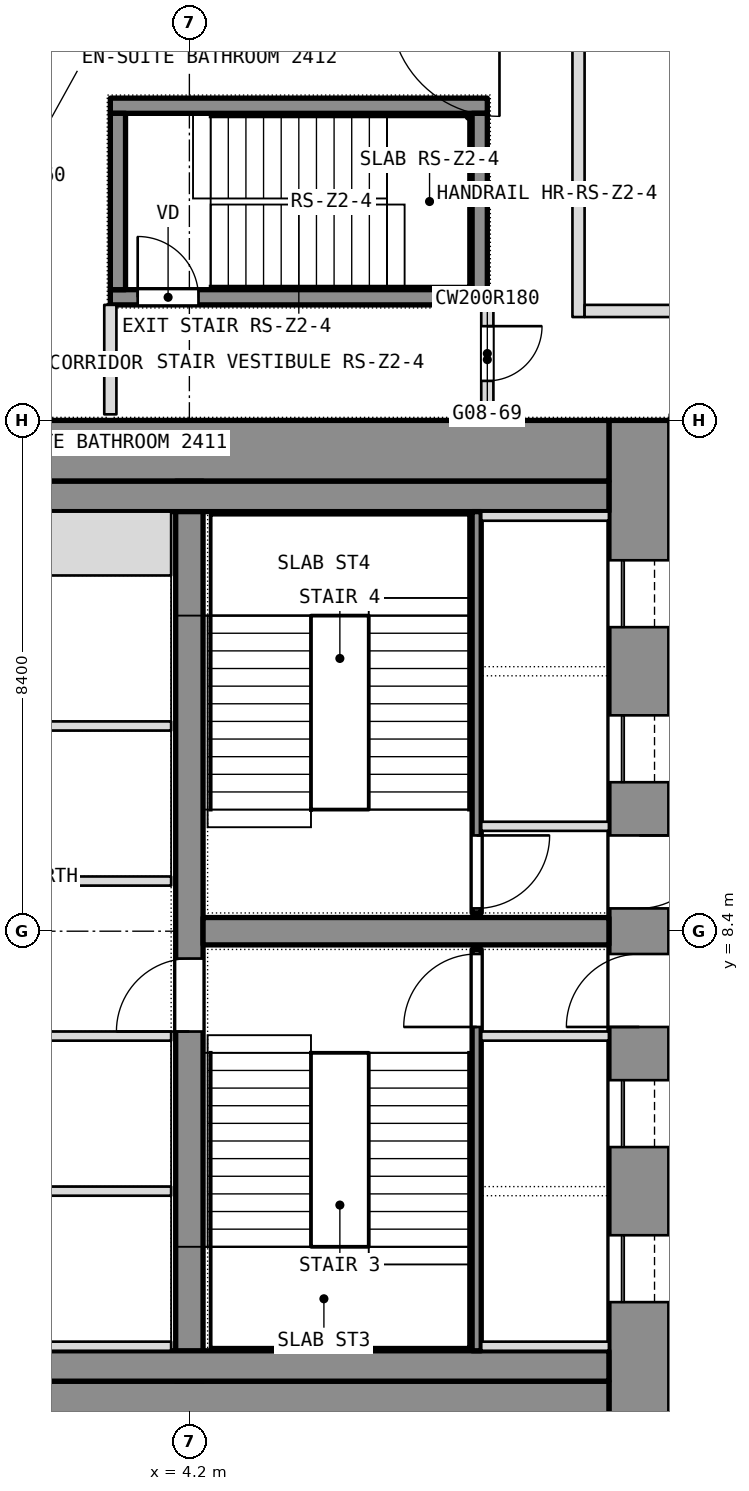
"""IFC4 building model, lengths in metres.
Left out: names, types, materials, properties, quantities, classifications, styles, units other than length and angle.
Written with IfcOpenShell. Run it as: python <this file> out.ifc"""

import sys

from ifc_helpers import new_model, si_unit, direction, frame, frame_2d, origin, place, context, subcontext, project, spatial, rectangle, extrude, element, fill, save


model = new_model("IFC4")
c1 = context("Model", 3, precision=1e-05, world=origin(), true_north=direction((0.0, 1.0)))
c2 = subcontext(c1, "Body", "Model", "MODEL_VIEW")
j1 = project(units=[si_unit("LENGTHUNIT", "METRE"), si_unit("PLANEANGLEUNIT", "RADIAN")], contexts=[c1])
p1 = place(None, origin())
s1 = spatial("IfcSite", under=j1, at=p1, CompositionType="ELEMENT")
p2 = place(p1, origin())
s2 = spatial("IfcBuilding", under=s1, at=p2, CompositionType="ELEMENT")
p3 = place(p2, frame((0.0, 0.0, 112.1)))
s3 = spatial("IfcBuildingStorey", under=s2, at=p3, CompositionType="ELEMENT", Elevation=112.1)
p4 = place(p3, frame((11.6, 0.0, 0.0), z_axis=(0.0, 0.0, 1.0), x_axis=(0.0, 1.0, 0.0)))
e1 = element("IfcWall", 1, at=p4, inside=s3, PredefinedType="SHEAR", context=c2, shape_type="SweptSolid", body=[
    extrude(rectangle(XDim=16.8, YDim=1.0, at=frame_2d((8.4, 0.0))), origin(), (0.0, 0.0, 1.0), 3.6),
])
p5 = place(p4, frame((2.3, 0.0, 0.0)))
e2 = element("IfcOpeningElement", 2, at=p5, cuts=e1, PredefinedType="OPENING", context=c2, shape_type="SweptSolid", body=[
    extrude(rectangle(XDim=1.1, YDim=2.1, at=frame_2d((0.55, 1.05))), frame((0.0, 0.5, 0.0), z_axis=(0.0, -1.0, 0.0), x_axis=(1.0, 0.0, 0.0)), (0.0, 0.0, 1.0), 1.0),
])
p6 = place(p4, frame((4.85, 0.0, 0.0)))
e3 = element("IfcOpeningElement", 3, at=p6, cuts=e1, PredefinedType="OPENING", context=c2, shape_type="SweptSolid", body=[
    extrude(rectangle(XDim=1.1, YDim=2.1, at=frame_2d((0.55, 1.05))), frame((0.0, 0.5, 0.0), z_axis=(0.0, -1.0, 0.0), x_axis=(1.0, 0.0, 0.0)), (0.0, 0.0, 1.0), 1.0),
])
p7 = place(p4, frame((6.825, 0.0, 0.0)))
e4 = element("IfcOpeningElement", 4, at=p7, cuts=e1, PredefinedType="OPENING", context=c2, shape_type="SweptSolid", body=[
    extrude(rectangle(XDim=1.2, YDim=2.1, at=frame_2d((0.6, 1.05))), frame((0.0, 0.5, 0.0), z_axis=(0.0, -1.0, 0.0), x_axis=(1.0, 0.0, 0.0)), (0.0, 0.0, 1.0), 1.0),
])
p8 = place(p4, frame((13.4, 0.0, 0.0)))
e5 = element("IfcOpeningElement", 5, at=p8, cuts=e1, PredefinedType="OPENING", context=c2, shape_type="SweptSolid", body=[
    extrude(rectangle(XDim=1.1, YDim=2.1, at=frame_2d((0.55, 1.05))), frame((0.0, 0.5, 0.0), z_axis=(0.0, -1.0, 0.0), x_axis=(1.0, 0.0, 0.0)), (0.0, 0.0, 1.0), 1.0),
])
p9 = place(p4, frame((10.85, 0.0, 0.0)))
e6 = element("IfcOpeningElement", 6, at=p9, cuts=e1, PredefinedType="OPENING", context=c2, shape_type="SweptSolid", body=[
    extrude(rectangle(XDim=1.1, YDim=2.1, at=frame_2d((0.55, 1.05))), frame((0.0, 0.5, 0.0), z_axis=(0.0, -1.0, 0.0), x_axis=(1.0, 0.0, 0.0)), (0.0, 0.0, 1.0), 1.0),
])
p10 = place(p4, frame((8.775, 0.0, 0.0)))
e7 = element("IfcOpeningElement", 7, at=p10, cuts=e1, PredefinedType="OPENING", context=c2, shape_type="SweptSolid", body=[
    extrude(rectangle(XDim=1.2, YDim=2.1, at=frame_2d((0.6, 1.05))), frame((0.0, 0.5, 0.0), z_axis=(0.0, -1.0, 0.0), x_axis=(1.0, 0.0, 0.0)), (0.0, 0.0, 1.0), 1.0),
])
for number, where, z_axis, x_axis in (
    (8, (-11.1, 0.5, 0.0), (0.0, 0.0, 1.0), (1.0, 0.0, 0.0)),
    (9, (-11.1, 16.3, 0.0), (0.0, 0.0, 1.0), (1.0, 0.0, 0.0)),
):
    element("IfcWall", number, at=place(p3, frame(where, z_axis=z_axis, x_axis=x_axis)), inside=s3, PredefinedType="SHEAR", context=c2, shape_type="SweptSolid", body=[
        extrude(rectangle(XDim=22.2, YDim=1.0, at=frame_2d((11.1, 0.0))), origin(), (0.0, 0.0, 1.0), 3.6),
    ])
p11 = place(p3, frame((4.2, 1.0, 0.0), z_axis=(0.0, 0.0, 1.0), x_axis=(0.0, 1.0, 0.0)))
e10 = element("IfcWall", 10, at=p11, inside=s3, PredefinedType="SHEAR", context=c2, shape_type="SweptSolid", body=[
    extrude(rectangle(XDim=14.8, YDim=0.45, at=frame_2d((7.4, 0.0))), origin(), (0.0, 0.0, 1.0), 3.6),
])
p12 = place(p11, frame((5.75, 0.0, 0.0)))
e11 = element("IfcOpeningElement", 11, at=p12, cuts=e10, PredefinedType="OPENING", context=c2, shape_type="SweptSolid", body=[
    extrude(rectangle(XDim=1.2, YDim=2.1, at=frame_2d((0.6, 1.05))), frame((0.0, 0.225, 0.0), z_axis=(0.0, -1.0, 0.0), x_axis=(1.0, 0.0, 0.0)), (0.0, 0.0, 1.0), 0.45),
])
p13 = place(p3, frame((4.425, 8.4, 0.0), z_axis=(0.0, 0.0, 1.0), x_axis=(1.0, 0.0, 0.0)))
e12 = element("IfcWall", 12, at=p13, inside=s3, PredefinedType="SHEAR", context=c2, shape_type="SweptSolid", body=[
    extrude(rectangle(XDim=6.675, YDim=0.45, at=frame_2d((3.337, 0.0))), origin(), (0.0, 0.0, 1.0), 3.6),
])
p14 = place(p3, frame((10.6, 18.5, 0.0), z_axis=(0.0, 0.0, 1.0), x_axis=(0.0, 1.0, 0.0)))
e13 = element("IfcWall", 13, at=p14, inside=s3, PredefinedType="PARTITIONING", context=c2, shape_type="SweptSolid", body=[
    extrude(rectangle(XDim=5.0, YDim=0.2, at=frame_2d((2.5, 0.0))), origin(), (0.0, 0.0, 1.0), 3.34),
])
p15 = place(p3, frame((9.1, 16.9, 0.0), z_axis=(0.0, 0.0, 1.0), x_axis=(0.0, 1.0, 0.0)))
e14 = element("IfcWall", 14, at=p15, inside=s3, PredefinedType="PARTITIONING", context=c2, shape_type="SweptSolid", body=[
    extrude(rectangle(XDim=1.8, YDim=0.2, at=frame_2d((0.9, 0.0))), origin(), (0.0, 0.0, 1.0), 3.34),
])
p16 = place(p15, frame((0.55, 0.0, 0.0)))
e15 = element("IfcOpeningElement", 15, at=p16, cuts=e14, PredefinedType="OPENING", context=c2, shape_type="SweptSolid", body=[
    extrude(rectangle(XDim=0.9, YDim=2.1, at=frame_2d((0.45, 1.05))), frame((0.0, 0.1, 0.0), z_axis=(0.0, -1.0, 0.0), x_axis=(1.0, 0.0, 0.0)), (0.0, 0.0, 1.0), 0.2),
])
p17 = place(p3, frame((2.9, 16.9, 0.0), z_axis=(0.0, 0.0, 1.0), x_axis=(0.0, 1.0, 0.0)))
e16 = element("IfcWall", 16, at=p17, inside=s3, PredefinedType="PARTITIONING", context=c2, shape_type="SweptSolid", body=[
    extrude(rectangle(XDim=1.8, YDim=0.2, at=frame_2d((0.9, 0.0))), origin(), (0.0, 0.0, 1.0), 3.34),
])
p18 = place(p3, frame((10.7, 18.6, 0.0), z_axis=(0.0, 0.0, 1.0), x_axis=(1.0, 0.0, 0.0)))
e17 = element("IfcWall", 17, at=p18, inside=s3, PredefinedType="PARTITIONING", context=c2, shape_type="SweptSolid", body=[
    extrude(rectangle(XDim=6.2, YDim=0.2, at=frame_2d((3.1, 0.0))), origin(), (0.0, 0.0, 1.0), 3.34),
])
p19 = place(p18, frame((2.3, 0.0, 0.0)))
e18 = element("IfcOpeningElement", 18, at=p19, cuts=e17, PredefinedType="OPENING", context=c2, shape_type="SweptSolid", body=[
    extrude(rectangle(XDim=1.0, YDim=2.1, at=frame_2d((0.5, 1.05))), frame((0.0, 0.1, 0.0), z_axis=(0.0, -1.0, 0.0), x_axis=(1.0, 0.0, 0.0)), (0.0, 0.0, 1.0), 0.2),
])
for number, where, z_axis, x_axis in (
    (19, (-11.1, 1.25, 0.0), (0.0, 0.0, 1.0), (1.0, 0.0, 0.0)),
    (20, (-11.1, 15.55, 0.0), (0.0, 0.0, 1.0), (1.0, 0.0, 0.0)),
):
    element("IfcWall", number, at=place(p3, frame(where, z_axis=z_axis, x_axis=x_axis)), inside=s3, PredefinedType="PARTITIONING", context=c2, shape_type="SweptSolid", body=[
        extrude(rectangle(XDim=22.2, YDim=0.5, at=frame_2d((11.1, 0.0))), origin(), (0.0, 0.0, 1.0), 3.34),
    ])
p20 = place(p3, frame((8.925, 1.5, 0.0), z_axis=(0.0, 0.0, 1.0), x_axis=(0.0, 1.0, 0.0)))
e21 = element("IfcWall", 21, at=p20, inside=s3, PredefinedType="SHEAR", context=c2, shape_type="SweptSolid", body=[
    extrude(rectangle(XDim=6.6, YDim=0.15, at=frame_2d((3.3, 0.0))), origin(), (0.0, 0.0, 1.0), 3.34),
])
p21 = place(p20, frame((5.325, 0.0, 0.0)))
e22 = element("IfcOpeningElement", 22, at=p21, cuts=e21, PredefinedType="OPENING", context=c2, shape_type="SweptSolid", body=[
    extrude(rectangle(XDim=1.2, YDim=2.1, at=frame_2d((0.6, 1.05))), frame((0.0, 0.075, 0.0), z_axis=(0.0, -1.0, 0.0), x_axis=(1.0, 0.0, 0.0)), (0.0, 0.0, 1.0), 0.15),
])
for number, where, z_axis, x_axis in (
    (23, (9.0, 6.675, 0.0), (0.0, 0.0, 1.0), (1.0, 0.0, 0.0)),
    (24, (9.0, 1.575, 0.0), (0.0, 0.0, 1.0), (1.0, 0.0, 0.0)),
):
    element("IfcWall", number, at=place(p3, frame(where, z_axis=z_axis, x_axis=x_axis)), inside=s3, PredefinedType="SHEAR", context=c2, shape_type="SweptSolid", body=[
        extrude(rectangle(XDim=2.1, YDim=0.15, at=frame_2d((1.05, 0.0))), origin(), (0.0, 0.0, 1.0), 3.6),
    ])
p22 = place(p3, frame((8.925, 8.7, 0.0), z_axis=(0.0, 0.0, 1.0), x_axis=(0.0, 1.0, 0.0)))
e25 = element("IfcWall", 25, at=p22, inside=s3, PredefinedType="SHEAR", context=c2, shape_type="SweptSolid", body=[
    extrude(rectangle(XDim=6.6, YDim=0.15, at=frame_2d((3.3, 0.0))), origin(), (0.0, 0.0, 1.0), 3.34),
])
p23 = place(p22, frame((0.075, 0.0, 0.0)))
e26 = element("IfcOpeningElement", 26, at=p23, cuts=e25, PredefinedType="OPENING", context=c2, shape_type="SweptSolid", body=[
    extrude(rectangle(XDim=1.2, YDim=2.1, at=frame_2d((0.6, 1.05))), frame((0.0, 0.075, 0.0), z_axis=(0.0, -1.0, 0.0), x_axis=(1.0, 0.0, 0.0)), (0.0, 0.0, 1.0), 0.15),
])
for number, where, z_axis, x_axis in (
    (27, (9.0, 10.125, 0.0), (0.0, 0.0, 1.0), (1.0, 0.0, 0.0)),
    (28, (9.0, 15.225, 0.0), (0.0, 0.0, 1.0), (1.0, 0.0, 0.0)),
):
    element("IfcWall", number, at=place(p3, frame(where, z_axis=z_axis, x_axis=x_axis)), inside=s3, PredefinedType="SHEAR", context=c2, shape_type="SweptSolid", body=[
        extrude(rectangle(XDim=2.1, YDim=0.15, at=frame_2d((1.05, 0.0))), origin(), (0.0, 0.0, 1.0), 3.6),
    ])
p24 = place(p3, frame((-3.9, 4.125, 0.0), z_axis=(0.0, 0.0, 1.0), x_axis=(1.0, 0.0, 0.0)))
e29 = element("IfcWall", 29, at=p24, inside=s3, PredefinedType="PARTITIONING", context=c2, shape_type="SweptSolid", body=[
    extrude(rectangle(XDim=7.8, YDim=0.15, at=frame_2d((3.9, 0.0))), origin(), (0.0, 0.0, 1.0), 3.34),
])
p25 = place(p24, frame((3.75, 0.0, 0.0)))
e30 = element("IfcOpeningElement", 30, at=p25, cuts=e29, PredefinedType="OPENING", context=c2, shape_type="SweptSolid", body=[
    extrude(rectangle(XDim=1.2, YDim=2.1, at=frame_2d((0.6, 1.05))), frame((0.0, 0.075, 0.0), z_axis=(0.0, -1.0, 0.0), x_axis=(1.0, 0.0, 0.0)), (0.0, 0.0, 1.0), 0.15),
])
p26 = place(p3, frame((-3.9, 11.775, 0.0), z_axis=(0.0, 0.0, 1.0), x_axis=(1.0, 0.0, 0.0)))
e31 = element("IfcWall", 31, at=p26, inside=s3, PredefinedType="PARTITIONING", context=c2, shape_type="SweptSolid", body=[
    extrude(rectangle(XDim=7.8, YDim=0.15, at=frame_2d((3.9, 0.0))), origin(), (0.0, 0.0, 1.0), 3.34),
])
p27 = place(p26, frame((3.3, 0.0, 0.0)))
e32 = element("IfcOpeningElement", 32, at=p27, cuts=e31, PredefinedType="OPENING", context=c2, shape_type="SweptSolid", body=[
    extrude(rectangle(XDim=1.2, YDim=2.1, at=frame_2d((0.6, 1.05))), frame((0.0, 0.075, 0.0), z_axis=(0.0, -1.0, 0.0), x_axis=(1.0, 0.0, 0.0)), (0.0, 0.0, 1.0), 0.15),
])
p28 = place(p3, frame((1.65, 1.575, 0.0), z_axis=(0.0, 0.0, 1.0), x_axis=(1.0, 0.0, 0.0)))
e33 = element("IfcWall", 33, at=p28, inside=s3, PredefinedType="SHEAR", context=c2, shape_type="SweptSolid", body=[
    extrude(rectangle(XDim=2.25, YDim=0.15, at=frame_2d((1.125, 0.0))), origin(), (0.0, 0.0, 1.0), 3.6),
])
p29 = place(p3, frame((1.65, 14.775, 0.0), z_axis=(0.0, 0.0, 1.0), x_axis=(1.0, 0.0, 0.0)))
e34 = element("IfcWall", 34, at=p29, inside=s3, PredefinedType="SHEAR", context=c2, shape_type="SweptSolid", body=[
    extrude(rectangle(XDim=2.25, YDim=1.05, at=frame_2d((1.125, 0.0))), origin(), (0.0, 0.0, 1.0), 3.6),
])
for number, where, z_axis, x_axis in (
    (35, (1.65, 6.675, 0.0), (0.0, 0.0, 1.0), (1.0, 0.0, 0.0)),
    (36, (1.65, 9.225, 0.0), (0.0, 0.0, 1.0), (1.0, 0.0, 0.0)),
):
    element("IfcWall", number, at=place(p3, frame(where, z_axis=z_axis, x_axis=x_axis)), inside=s3, PredefinedType="SHEAR", context=c2, shape_type="SweptSolid", body=[
        extrude(rectangle(XDim=2.25, YDim=0.15, at=frame_2d((1.125, 0.0))), origin(), (0.0, 0.0, 1.0), 3.6),
    ])
p30 = place(p3, frame((12.1, 16.8, 0.0), z_axis=(0.0, 0.0, 1.0), x_axis=(1.0, 0.0, 0.0)))
e37 = element("IfcWall", 37, at=p30, inside=s3, PredefinedType="PARTITIONING", context=c2, shape_type="SweptSolid", body=[
    extrude(rectangle(XDim=4.6, YDim=0.2, at=frame_2d((2.3, 0.0))), origin(), (0.0, 0.0, 1.0), 2.89),
])
p31 = place(p3, frame((2.9, 18.825, 0.1), z_axis=(0.0, 0.0, 1.0), x_axis=(1.0, 0.0, 0.0)))
e38 = element("IfcWall", 38, at=p31, inside=s3, PredefinedType="SHEAR", context=c2, shape_type="SweptSolid", body=[
    extrude(rectangle(XDim=6.2, YDim=0.25, at=frame_2d((3.1, 0.0))), origin(), (0.0, 0.0, 1.0), 3.6),
])
p32 = place(p31, frame((0.45, 0.0, 0.0)))
e39 = element("IfcOpeningElement", 39, at=p32, cuts=e38, PredefinedType="OPENING", context=c2, shape_type="SweptSolid", body=[
    extrude(rectangle(XDim=1.0, YDim=2.1, at=frame_2d((0.5, 1.05))), frame((0.0, 0.125, 0.0), z_axis=(0.0, -1.0, 0.0), x_axis=(1.0, 0.0, 0.0)), (0.0, 0.0, 1.0), 0.25),
])
p33 = place(p3, frame((2.9, 21.975, 0.1), z_axis=(0.0, 0.0, 1.0), x_axis=(1.0, 0.0, 0.0)))
e40 = element("IfcWall", 40, at=p33, inside=s3, PredefinedType="SHEAR", context=c2, shape_type="SweptSolid", body=[
    extrude(rectangle(XDim=6.2, YDim=0.25, at=frame_2d((3.1, 0.0))), origin(), (0.0, 0.0, 1.0), 3.6),
])
for number, where, z_axis, x_axis in (
    (41, (3.025, 18.95, 0.1), (0.0, 0.0, 1.0), (0.0, 1.0, 0.0)),
    (42, (8.975, 18.95, 0.1), (0.0, 0.0, 1.0), (0.0, 1.0, 0.0)),
):
    element("IfcWall", number, at=place(p3, frame(where, z_axis=z_axis, x_axis=x_axis)), inside=s3, PredefinedType="SHEAR", context=c2, shape_type="SweptSolid", body=[
        extrude(rectangle(XDim=2.9, YDim=0.25, at=frame_2d((1.45, 0.0))), origin(), (0.0, 0.0, 1.0), 3.6),
    ])
p34 = place(p16, origin())
e43 = element("IfcDoor", 43, at=p34, inside=s3, OperationType="SINGLE_SWING_RIGHT", PredefinedType="DOOR", context=c2, shape_type="SweptSolid", body=[
    extrude(rectangle(XDim=0.9, YDim=2.1, at=frame_2d((0.45, 1.05))), frame((0.0, 0.025, 0.0), z_axis=(0.0, -1.0, 0.0), x_axis=(1.0, 0.0, 0.0)), (0.0, 0.0, 1.0), 0.05),
])
fill(e15, e43)
p35 = place(p32, origin())
e44 = element("IfcDoor", 44, at=p35, inside=s3, OperationType="SINGLE_SWING_LEFT", PredefinedType="DOOR", context=c2, shape_type="SweptSolid", body=[
    extrude(rectangle(XDim=1.0, YDim=2.1, at=frame_2d((0.5, 1.05))), frame((0.0, 0.025, 0.0), z_axis=(0.0, -1.0, 0.0), x_axis=(1.0, 0.0, 0.0)), (0.0, 0.0, 1.0), 0.05),
])
fill(e39, e44)
p36 = place(p5, origin())
e45 = element("IfcDoor", 45, at=p36, inside=s3, OperationType="SLIDING_TO_LEFT", PredefinedType="DOOR", context=c2, shape_type="SweptSolid", body=[
    extrude(rectangle(XDim=1.1, YDim=2.1, at=frame_2d((0.55, 1.05))), frame((0.0, 0.025, 0.0), z_axis=(0.0, -1.0, 0.0), x_axis=(1.0, 0.0, 0.0)), (0.0, 0.0, 1.0), 0.05),
])
fill(e2, e45)
p37 = place(p6, origin())
e46 = element("IfcDoor", 46, at=p37, inside=s3, OperationType="SLIDING_TO_LEFT", PredefinedType="DOOR", context=c2, shape_type="SweptSolid", body=[
    extrude(rectangle(XDim=1.1, YDim=2.1, at=frame_2d((0.55, 1.05))), frame((0.0, 0.025, 0.0), z_axis=(0.0, -1.0, 0.0), x_axis=(1.0, 0.0, 0.0)), (0.0, 0.0, 1.0), 0.05),
])
fill(e3, e46)
p38 = place(p7, origin())
e47 = element("IfcDoor", 47, at=p38, inside=s3, OperationType="SINGLE_SWING_LEFT", PredefinedType="DOOR", context=c2, shape_type="SweptSolid", body=[
    extrude(rectangle(XDim=1.2, YDim=2.1, at=frame_2d((0.6, 1.05))), frame((0.0, 0.025, 0.0), z_axis=(0.0, -1.0, 0.0), x_axis=(1.0, 0.0, 0.0)), (0.0, 0.0, 1.0), 0.05),
])
fill(e4, e47)
p39 = place(p21, origin())
e48 = element("IfcDoor", 48, at=p39, inside=s3, OperationType="SINGLE_SWING_LEFT", PredefinedType="DOOR", context=c2, shape_type="SweptSolid", body=[
    extrude(rectangle(XDim=1.2, YDim=2.1, at=frame_2d((0.6, 1.05))), frame((0.0, 0.025, 0.0), z_axis=(0.0, -1.0, 0.0), x_axis=(1.0, 0.0, 0.0)), (0.0, 0.0, 1.0), 0.05),
])
fill(e22, e48)
p40 = place(p8, origin())
e49 = element("IfcDoor", 49, at=p40, inside=s3, OperationType="SLIDING_TO_LEFT", PredefinedType="DOOR", context=c2, shape_type="SweptSolid", body=[
    extrude(rectangle(XDim=1.1, YDim=2.1, at=frame_2d((0.55, 1.05))), frame((0.0, 0.025, 0.0), z_axis=(0.0, -1.0, 0.0), x_axis=(1.0, 0.0, 0.0)), (0.0, 0.0, 1.0), 0.05),
])
fill(e5, e49)
p41 = place(p9, origin())
e50 = element("IfcDoor", 50, at=p41, inside=s3, OperationType="SLIDING_TO_LEFT", PredefinedType="DOOR", context=c2, shape_type="SweptSolid", body=[
    extrude(rectangle(XDim=1.1, YDim=2.1, at=frame_2d((0.55, 1.05))), frame((0.0, 0.025, 0.0), z_axis=(0.0, -1.0, 0.0), x_axis=(1.0, 0.0, 0.0)), (0.0, 0.0, 1.0), 0.05),
])
fill(e6, e50)
p42 = place(p10, origin())
e51 = element("IfcDoor", 51, at=p42, inside=s3, OperationType="SINGLE_SWING_LEFT", PredefinedType="DOOR", context=c2, shape_type="SweptSolid", body=[
    extrude(rectangle(XDim=1.2, YDim=2.1, at=frame_2d((0.6, 1.05))), frame((0.0, 0.025, 0.0), z_axis=(0.0, -1.0, 0.0), x_axis=(1.0, 0.0, 0.0)), (0.0, 0.0, 1.0), 0.05),
])
fill(e7, e51)
p43 = place(p23, origin())
e52 = element("IfcDoor", 52, at=p43, inside=s3, OperationType="SINGLE_SWING_LEFT", PredefinedType="DOOR", context=c2, shape_type="SweptSolid", body=[
    extrude(rectangle(XDim=1.2, YDim=2.1, at=frame_2d((0.6, 1.05))), frame((0.0, 0.025, 0.0), z_axis=(0.0, -1.0, 0.0), x_axis=(1.0, 0.0, 0.0)), (0.0, 0.0, 1.0), 0.05),
])
fill(e26, e52)
p44 = place(p12, origin())
e53 = element("IfcDoor", 53, at=p44, inside=s3, OperationType="SINGLE_SWING_LEFT", PredefinedType="DOOR", context=c2, shape_type="SweptSolid", body=[
    extrude(rectangle(XDim=1.2, YDim=2.1, at=frame_2d((0.6, 1.05))), frame((0.0, 0.025, 0.0), z_axis=(0.0, -1.0, 0.0), x_axis=(1.0, 0.0, 0.0)), (0.0, 0.0, 1.0), 0.05),
])
fill(e11, e53)
save(model, sys.argv[1])
